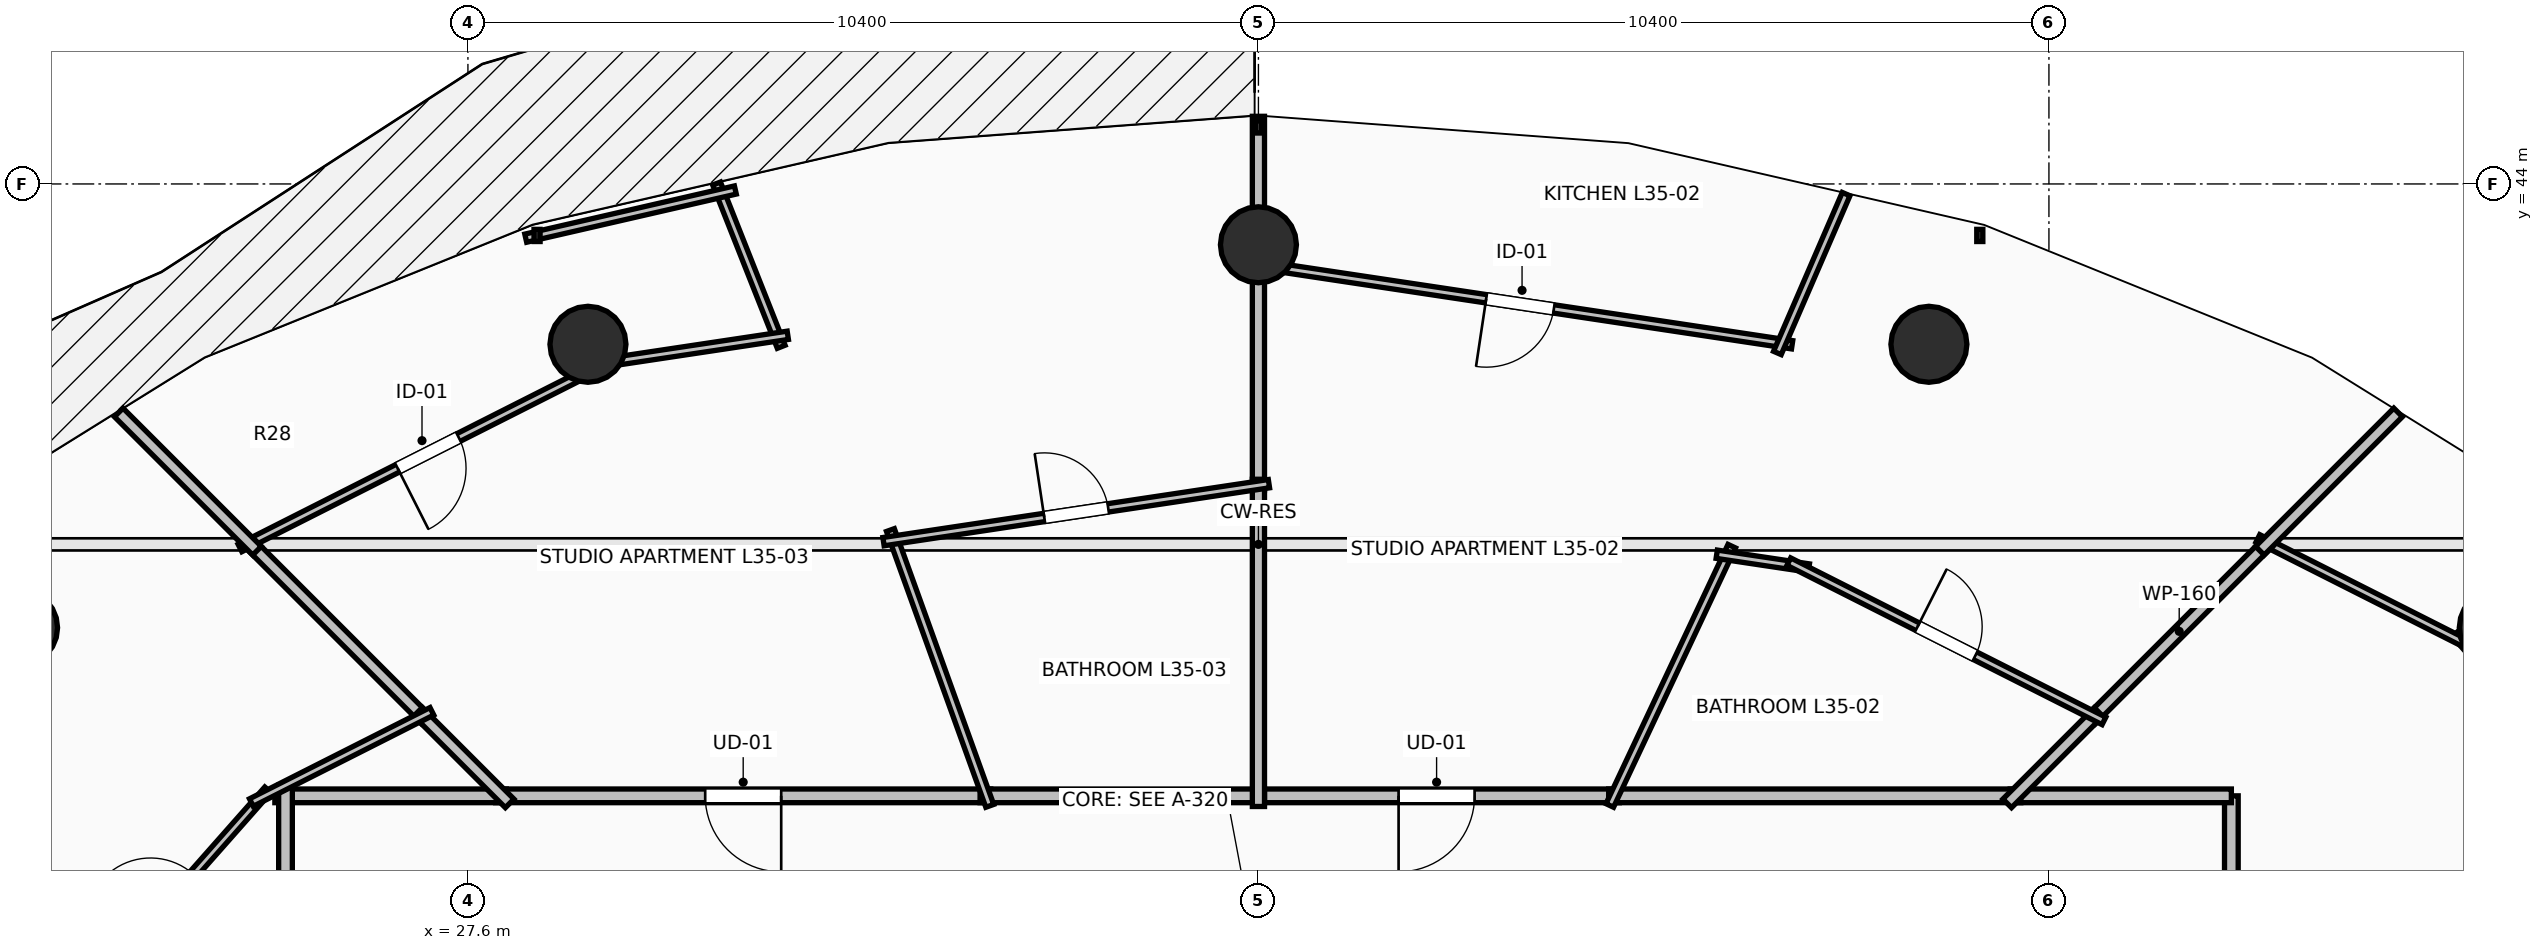
"""IFC4 building model, lengths in metres.
Left out: names, types, materials, properties, quantities, classifications, styles, units other than length and angle.
Written with IfcOpenShell. Run it as: python <this file> out.ifc"""

import sys

from ifc_helpers import new_model, si_unit, direction, frame, frame_2d, origin, origin_2d, place, context, subcontext, project, spatial, rectangle, circle, extrude, element, fill, save


model = new_model("IFC4")
c1 = context("Model", 3, precision=1e-05, world=origin(), true_north=direction((0.0, 1.0)))
c2 = subcontext(c1, "Body", "Model", "MODEL_VIEW")
j1 = project(units=[si_unit("LENGTHUNIT", "METRE"), si_unit("PLANEANGLEUNIT", "RADIAN")], contexts=[c1])
p1 = place(None, origin())
s1 = spatial("IfcSite", under=j1, at=p1, CompositionType="ELEMENT")
p2 = place(p1, origin())
s2 = spatial("IfcBuilding", under=s1, at=p2, CompositionType="ELEMENT")
p3 = place(p2, frame((0.0, 0.0, 132.6)))
s3 = spatial("IfcBuildingStorey", under=s2, at=p3, CompositionType="ELEMENT", Elevation=132.6)
for number, where, z_axis, x_axis in (
    (1, (54.299, 38.162, 0.0), (0.0, 0.0, 1.0), (0.707, 0.707, 0.0)),
    (2, (46.821, 41.891, 0.0), (0.0, 0.0, 1.0), (0.383, 0.924, 0.0)),
    (3, (38.0, 43.2, 0.0), (0.0, 0.0, 1.0), (0.0, 1.0, 0.0)),
    (4, (29.179, 41.891, 0.0), (0.0, 0.0, 1.0), (-0.383, 0.924, 0.0)),
    (5, (21.701, 38.162, 0.0), (0.0, 0.0, 1.0), (-0.707, 0.707, 0.0)),
):
    element("IfcColumn", number, at=place(p3, frame(where, z_axis=z_axis, x_axis=x_axis)), inside=s3, PredefinedType="COLUMN", context=c2, shape_type="SweptSolid", body=[
        extrude(circle(Radius=0.5, at=origin_2d()), origin(), (0.0, 0.0, 1.0), 3.5),
    ])
p4 = place(p3, frame((50.8, 30.548, 0.0), z_axis=(0.0, 0.0, 1.0), x_axis=(0.0, 1.0, 0.0)))
e6 = element("IfcWall", 6, at=p4, inside=s3, PredefinedType="PARTITIONING", context=c2, shape_type="SweptSolid", body=[
    extrude(rectangle(XDim=5.402, YDim=0.18, at=frame_2d((2.701, 0.0))), origin(), (0.0, 0.0, 1.0), 2.432),
])
p5 = place(p4, frame((2.201, 0.0, 0.0)))
e7 = element("IfcOpeningElement", 7, at=p5, cuts=e6, PredefinedType="OPENING", context=c2, shape_type="SweptSolid", body=[
    extrude(rectangle(XDim=1.0, YDim=2.15, at=frame_2d((0.5, 1.075))), frame((0.0, 0.105, 0.0), z_axis=(0.0, -1.0, 0.0), x_axis=(1.0, 0.0, 0.0)), (0.0, 0.0, 1.0), 0.21),
])
p6 = place(p3, frame((50.8, 35.95, 0.0), z_axis=(0.0, 0.0, 1.0), x_axis=(-1.0, 0.0, 0.0)))
e8 = element("IfcWall", 8, at=p6, inside=s3, PredefinedType="PARTITIONING", context=c2, shape_type="SweptSolid", body=[
    extrude(rectangle(XDim=2.91, YDim=0.18, at=frame_2d((1.455, 0.0))), origin(), (0.0, 0.0, 1.0), 2.432),
])
p7 = place(p3, frame((42.748, 35.95, 0.0), z_axis=(0.0, 0.0, 1.0), x_axis=(-1.0, 0.0, 0.0)))
e9 = element("IfcWall", 9, at=p7, inside=s3, PredefinedType="PARTITIONING", context=c2, shape_type="SweptSolid", body=[
    extrude(rectangle(XDim=4.808, YDim=0.18, at=frame_2d((2.404, 0.0))), origin(), (0.0, 0.0, 1.0), 3.24),
])
p8 = place(p7, frame((1.904, 0.0, 0.0)))
e10 = element("IfcOpeningElement", 10, at=p8, cuts=e9, PredefinedType="OPENING", context=c2, shape_type="SweptSolid", body=[
    extrude(rectangle(XDim=1.0, YDim=2.15, at=frame_2d((0.5, 1.075))), frame((0.0, 0.105, 0.0), z_axis=(0.0, -1.0, 0.0), x_axis=(1.0, 0.0, 0.0)), (0.0, 0.0, 1.0), 0.21),
])
p9 = place(p3, frame((48.03, 35.95, 0.0), z_axis=(0.0, 0.0, 1.0), x_axis=(-1.0, 0.0, 0.0)))
e11 = element("IfcWall", 11, at=p9, inside=s3, PredefinedType="PARTITIONING", context=c2, shape_type="SweptSolid", body=[
    extrude(rectangle(XDim=5.422, YDim=0.18, at=frame_2d((2.711, 0.0))), origin(), (0.0, 0.0, 1.0), 2.432),
])
p10 = place(p3, frame((34.478, 35.95, 0.0), z_axis=(0.0, 0.0, 1.0), x_axis=(-1.0, 0.0, 0.0)))
e12 = element("IfcWall", 12, at=p10, inside=s3, PredefinedType="PARTITIONING", context=c2, shape_type="SweptSolid", body=[
    extrude(rectangle(XDim=6.513, YDim=0.18, at=frame_2d((3.256, 0.0))), origin(), (0.0, 0.0, 1.0), 2.432),
])
p11 = place(p10, frame((2.757, 0.0, 0.0)))
e13 = element("IfcOpeningElement", 13, at=p11, cuts=e12, PredefinedType="OPENING", context=c2, shape_type="SweptSolid", body=[
    extrude(rectangle(XDim=1.0, YDim=2.15, at=frame_2d((0.5, 1.075))), frame((0.0, 0.105, 0.0), z_axis=(0.0, -1.0, 0.0), x_axis=(1.0, 0.0, 0.0)), (0.0, 0.0, 1.0), 0.21),
])
p12 = place(p3, frame((38.08, 35.95, 0.0), z_axis=(0.0, 0.0, 1.0), x_axis=(-1.0, 0.0, 0.0)))
e14 = element("IfcWall", 14, at=p12, inside=s3, PredefinedType="PARTITIONING", context=c2, shape_type="SweptSolid", body=[
    extrude(rectangle(XDim=3.742, YDim=0.18, at=frame_2d((1.871, 0.0))), origin(), (0.0, 0.0, 1.0), 3.24),
])
p13 = place(p3, frame((28.105, 35.95, 0.0), z_axis=(0.0, 0.0, 1.0), x_axis=(-1.0, 0.0, 0.0)))
e15 = element("IfcWall", 15, at=p13, inside=s3, PredefinedType="PARTITIONING", context=c2, shape_type="SweptSolid", body=[
    extrude(rectangle(XDim=3.045, YDim=0.18, at=frame_2d((1.522, 0.0))), origin(), (0.0, 0.0, 1.0), 2.432),
])
p14 = place(p3, frame((25.2, 36.09, 0.0), z_axis=(0.0, 0.0, 1.0), x_axis=(0.0, -1.0, 0.0)))
e16 = element("IfcWall", 16, at=p14, inside=s3, PredefinedType="PARTITIONING", context=c2, shape_type="SweptSolid", body=[
    extrude(rectangle(XDim=4.141, YDim=0.18, at=frame_2d((2.071, 0.0))), origin(), (0.0, 0.0, 1.0), 2.432),
])
p15 = place(p3, frame((57.668, 33.645, 0.0), z_axis=(0.0, 0.0, 1.0), x_axis=(-0.66214504072, 0.749375703536, 0.0)))
e17 = element("IfcWall", 17, at=p15, inside=s3, PredefinedType="PARTITIONING", context=c2, shape_type="SweptSolid", body=[
    extrude(rectangle(XDim=5.922, YDim=0.11, at=frame_2d((2.961, 0.0))), origin(), (0.0, 0.0, 1.0), 2.432),
])
p16 = place(p15, frame((2.511, 0.0, 0.0)))
e18 = element("IfcOpeningElement", 18, at=p16, cuts=e17, PredefinedType="OPENING", context=c2, shape_type="SweptSolid", body=[
    extrude(rectangle(XDim=0.9, YDim=2.1, at=frame_2d((0.45, 1.05))), frame((0.0, 0.07, 0.0), z_axis=(0.0, -1.0, 0.0), x_axis=(1.0, 0.0, 0.0)), (0.0, 0.0, 1.0), 0.14),
])
p17 = place(p3, frame((53.964, 37.915, 0.0), z_axis=(0.0, 0.0, 1.0), x_axis=(-0.892546166909, 0.450956028828, 0.0)))
e19 = element("IfcWall", 19, at=p17, inside=s3, PredefinedType="PARTITIONING", context=c2, shape_type="SweptSolid", body=[
    extrude(rectangle(XDim=3.154, YDim=0.11, at=frame_2d((1.577, 0.0))), origin(), (0.0, 0.0, 1.0), 2.432),
])
p18 = place(p3, frame((51.274, 39.274, 0.0), z_axis=(0.0, 0.0, 1.0), x_axis=(-0.707106781187, -0.707106781187, 0.0)))
e20 = element("IfcWall", 20, at=p18, inside=s3, PredefinedType="PARTITIONING", context=c2, shape_type="SweptSolid", body=[
    extrude(rectangle(XDim=3.281, YDim=0.16, at=frame_2d((1.64, 0.0))), origin(), (0.0, 0.0, 1.0), 2.874),
])
p19 = place(p3, frame((49.053, 37.053, 0.0), z_axis=(0.0, 0.0, 1.0), x_axis=(-0.707106781187, -0.707106781187, 0.0)))
e21 = element("IfcWall", 21, at=p19, inside=s3, PredefinedType="PARTITIONING", context=c2, shape_type="SweptSolid", body=[
    extrude(rectangle(XDim=1.7, YDim=0.16, at=frame_2d((0.85, 0.0))), origin(), (0.0, 0.0, 1.0), 2.432),
])
p20 = place(p3, frame((52.994, 40.994, 0.0), z_axis=(0.0, 0.0, 1.0), x_axis=(-0.707106781187, -0.707106781187, 0.0)))
e22 = element("IfcWall", 22, at=p20, inside=s3, PredefinedType="PARTITIONING", context=c2, shape_type="SweptSolid", body=[
    extrude(rectangle(XDim=2.572, YDim=0.16, at=frame_2d((1.286, 0.0))), origin(), (0.0, 0.0, 1.0), 2.728),
])
p21 = place(p3, frame((42.622, 35.823, 0.0), z_axis=(0.0, 0.0, 1.0), x_axis=(0.425768969191, 0.904831909735, 0.0)))
e23 = element("IfcWall", 23, at=p21, inside=s3, PredefinedType="PARTITIONING", context=c2, shape_type="SweptSolid", body=[
    extrude(rectangle(XDim=3.77, YDim=0.11, at=frame_2d((1.885, 0.0))), origin(), (0.0, 0.0, 1.0), 2.874),
])
p22 = place(p3, frame((44.03, 39.129, 0.0), z_axis=(0.0, 0.0, 1.0), x_axis=(0.988983067014, -0.148028690329, 0.0)))
e24 = element("IfcWall", 24, at=p22, inside=s3, PredefinedType="PARTITIONING", context=c2, shape_type="SweptSolid", body=[
    extrude(rectangle(XDim=1.225, YDim=0.11, at=frame_2d((0.613, 0.0))), origin(), (0.0, 0.0, 1.0), 2.874),
])
p23 = place(p3, frame((44.978, 39.031, 0.0), z_axis=(0.0, 0.0, 1.0), x_axis=(0.892495276856, -0.451056737882, 0.0)))
e25 = element("IfcWall", 25, at=p23, inside=s3, PredefinedType="PARTITIONING", context=c2, shape_type="SweptSolid", body=[
    extrude(rectangle(XDim=4.645, YDim=0.11, at=frame_2d((2.323, 0.0))), origin(), (0.0, 0.0, 1.0), 2.432),
])
p24 = place(p23, frame((1.898, 0.0, 0.0)))
e26 = element("IfcOpeningElement", 26, at=p24, cuts=e25, PredefinedType="OPENING", context=c2, shape_type="SweptSolid", body=[
    extrude(rectangle(XDim=0.85, YDim=2.1, at=frame_2d((0.425, 1.05))), frame((0.0, 0.07, 0.0), z_axis=(0.0, -1.0, 0.0), x_axis=(1.0, 0.0, 0.0)), (0.0, 0.0, 1.0), 0.14),
])
p25 = place(p3, frame((45.021, 41.884, 0.0), z_axis=(0.0, 0.0, 1.0), x_axis=(-0.988887079739, 0.148668569392, 0.0)))
e27 = element("IfcWall", 27, at=p25, inside=s3, PredefinedType="PARTITIONING", context=c2, shape_type="SweptSolid", body=[
    extrude(rectangle(XDim=7.24, YDim=0.11, at=frame_2d((3.62, 0.0))), origin(), (0.0, 0.0, 1.0), 2.432),
])
p26 = place(p25, frame((3.17, 0.0, 0.0)))
e28 = element("IfcOpeningElement", 28, at=p26, cuts=e27, PredefinedType="OPENING", context=c2, shape_type="SweptSolid", body=[
    extrude(rectangle(XDim=0.9, YDim=2.1, at=frame_2d((0.45, 1.05))), frame((0.0, 0.07, 0.0), z_axis=(0.0, -1.0, 0.0), x_axis=(1.0, 0.0, 0.0)), (0.0, 0.0, 1.0), 0.14),
])
p27 = place(p3, frame((45.732, 43.866, 0.0), z_axis=(0.0, 0.0, 1.0), x_axis=(-0.397125966554, -0.91776411277, 0.0)))
e29 = element("IfcWall", 29, at=p27, inside=s3, PredefinedType="PARTITIONING", context=c2, shape_type="SweptSolid", body=[
    extrude(rectangle(XDim=2.277, YDim=0.11, at=frame_2d((1.139, 0.0))), origin(), (0.0, 0.0, 1.0), 2.728),
])
p28 = place(p3, frame((38.0, 42.94, 0.0), z_axis=(0.0, 0.0, 1.0), x_axis=(0.0, -1.0, 0.0)))
e30 = element("IfcWall", 30, at=p28, inside=s3, PredefinedType="PARTITIONING", context=c2, shape_type="SweptSolid", body=[
    extrude(rectangle(XDim=2.965, YDim=0.16, at=frame_2d((1.482, 0.0))), origin(), (0.0, 0.0, 1.0), 2.874),
])
p29 = place(p3, frame((38.0, 40.115, 0.0), z_axis=(0.0, 0.0, 1.0), x_axis=(0.0, -1.0, 0.0)))
e31 = element("IfcWall", 31, at=p29, inside=s3, PredefinedType="PARTITIONING", context=c2, shape_type="SweptSolid", body=[
    extrude(rectangle(XDim=4.305, YDim=0.16, at=frame_2d((2.152, 0.0))), origin(), (0.0, 0.0, 1.0), 2.874),
])
p30 = place(p3, frame((38.0, 44.89, 0.0), z_axis=(0.0, 0.0, 1.0), x_axis=(0.0, -1.0, 0.0)))
e32 = element("IfcWall", 32, at=p30, inside=s3, PredefinedType="PARTITIONING", context=c2, shape_type="SweptSolid", body=[
    extrude(rectangle(XDim=2.09, YDim=0.16, at=frame_2d((1.045, 0.0))), origin(), (0.0, 0.0, 1.0), 3.24),
])
p31 = place(p3, frame((34.465, 35.818, 0.0), z_axis=(0.0, 0.0, 1.0), x_axis=(-0.338813618534, 0.940853512453, 0.0)))
e33 = element("IfcWall", 33, at=p31, inside=s3, PredefinedType="PARTITIONING", context=c2, shape_type="SweptSolid", body=[
    extrude(rectangle(XDim=3.856, YDim=0.11, at=frame_2d((1.928, 0.0))), origin(), (0.0, 0.0, 1.0), 2.432),
])
p32 = place(p3, frame((33.068, 39.294, 0.0), z_axis=(0.0, 0.0, 1.0), x_axis=(0.988876905643, 0.148736227888, 0.0)))
e34 = element("IfcWall", 34, at=p32, inside=s3, PredefinedType="PARTITIONING", context=c2, shape_type="SweptSolid", body=[
    extrude(rectangle(XDim=5.128, YDim=0.11, at=frame_2d((2.564, 0.0))), origin(), (0.0, 0.0, 1.0), 2.432),
])
p33 = place(p32, frame((2.139, 0.0, 0.0)))
e35 = element("IfcOpeningElement", 35, at=p33, cuts=e34, PredefinedType="OPENING", context=c2, shape_type="SweptSolid", body=[
    extrude(rectangle(XDim=0.85, YDim=2.1, at=frame_2d((0.425, 1.05))), frame((0.0, 0.07, 0.0), z_axis=(0.0, -1.0, 0.0), x_axis=(1.0, 0.0, 0.0)), (0.0, 0.0, 1.0), 0.14),
])
p34 = place(p3, frame((30.872, 44.005, 0.0), z_axis=(0.0, 0.0, 1.0), x_axis=(0.368016079814, -0.929819426017, 0.0)))
e36 = element("IfcWall", 36, at=p34, inside=s3, PredefinedType="PARTITIONING", context=c2, shape_type="SweptSolid", body=[
    extrude(rectangle(XDim=2.309, YDim=0.11, at=frame_2d((1.155, 0.0))), origin(), (0.0, 0.0, 1.0), 2.728),
])
p35 = place(p3, frame((31.808, 42.009, 0.0), z_axis=(0.0, 0.0, 1.0), x_axis=(-0.988887788943, -0.148663851958, 0.0)))
e37 = element("IfcWall", 37, at=p35, inside=s3, PredefinedType="PARTITIONING", context=c2, shape_type="SweptSolid", body=[
    extrude(rectangle(XDim=2.547, YDim=0.11, at=frame_2d((1.273, 0.0))), origin(), (0.0, 0.0, 1.0), 3.24),
])
p36 = place(p3, frame((29.553, 41.714, 0.0), z_axis=(0.0, 0.0, 1.0), x_axis=(-0.892438454993, -0.451169152369, 0.0)))
e38 = element("IfcWall", 38, at=p36, inside=s3, PredefinedType="PARTITIONING", context=c2, shape_type="SweptSolid", body=[
    extrude(rectangle(XDim=5.549, YDim=0.11, at=frame_2d((2.774, 0.0))), origin(), (0.0, 0.0, 1.0), 2.432),
])
p37 = place(p36, frame((2.324, 0.0, 0.0)))
e39 = element("IfcOpeningElement", 39, at=p37, cuts=e38, PredefinedType="OPENING", context=c2, shape_type="SweptSolid", body=[
    extrude(rectangle(XDim=0.9, YDim=2.1, at=frame_2d((0.45, 1.05))), frame((0.0, 0.07, 0.0), z_axis=(0.0, -1.0, 0.0), x_axis=(1.0, 0.0, 0.0)), (0.0, 0.0, 1.0), 0.14),
])
p38 = place(p3, frame((31.118, 43.92, 0.0), z_axis=(0.0, 0.0, 1.0), x_axis=(-0.974594373263, -0.223977247963, 0.0)))
e40 = element("IfcWall", 40, at=p38, inside=s3, PredefinedType="PARTITIONING", context=c2, shape_type="SweptSolid", body=[
    extrude(rectangle(XDim=2.83, YDim=0.11, at=frame_2d((1.415, 0.0))), origin(), (0.0, 0.0, 1.0), 3.24),
])
p39 = place(p3, frame((24.726, 39.274, 0.0), z_axis=(0.0, 0.0, 1.0), x_axis=(0.707106781187, -0.707106781187, 0.0)))
e41 = element("IfcWall", 41, at=p39, inside=s3, PredefinedType="PARTITIONING", context=c2, shape_type="SweptSolid", body=[
    extrude(rectangle(XDim=3.277, YDim=0.16, at=frame_2d((1.638, 0.0))), origin(), (0.0, 0.0, 1.0), 2.874),
])
p40 = place(p3, frame((26.944, 37.056, 0.0), z_axis=(0.0, 0.0, 1.0), x_axis=(0.707106781187, -0.707106781187, 0.0)))
e42 = element("IfcWall", 42, at=p40, inside=s3, PredefinedType="PARTITIONING", context=c2, shape_type="SweptSolid", body=[
    extrude(rectangle(XDim=1.704, YDim=0.16, at=frame_2d((0.852, 0.0))), origin(), (0.0, 0.0, 1.0), 2.432),
])
p41 = place(p3, frame((23.006, 40.994, 0.0), z_axis=(0.0, 0.0, 1.0), x_axis=(0.707106781187, -0.707106781187, 0.0)))
e43 = element("IfcWall", 43, at=p41, inside=s3, PredefinedType="PARTITIONING", context=c2, shape_type="SweptSolid", body=[
    extrude(rectangle(XDim=2.572, YDim=0.16, at=frame_2d((1.286, 0.0))), origin(), (0.0, 0.0, 1.0), 2.728),
])
p42 = place(p3, frame((22.443, 33.172, 0.0), z_axis=(0.0, 0.0, 1.0), x_axis=(0.662199468358, 0.749327607997, 0.0)))
e44 = element("IfcWall", 44, at=p42, inside=s3, PredefinedType="PARTITIONING", context=c2, shape_type="SweptSolid", body=[
    extrude(rectangle(XDim=3.814, YDim=0.11, at=frame_2d((1.907, 0.0))), origin(), (0.0, 0.0, 1.0), 2.432),
])
p43 = place(p42, frame((1.482, 0.0, 0.0)))
e45 = element("IfcOpeningElement", 45, at=p43, cuts=e44, PredefinedType="OPENING", context=c2, shape_type="SweptSolid", body=[
    extrude(rectangle(XDim=0.85, YDim=2.1, at=frame_2d((0.425, 1.05))), frame((0.0, 0.07, 0.0), z_axis=(0.0, -1.0, 0.0), x_axis=(1.0, 0.0, 0.0)), (0.0, 0.0, 1.0), 0.14),
])
p44 = place(p3, frame((24.751, 35.862, 0.0), z_axis=(0.0, 0.0, 1.0), x_axis=(0.892455114256, 0.451136197882, 0.0)))
e46 = element("IfcWall", 46, at=p44, inside=s3, PredefinedType="PARTITIONING", context=c2, shape_type="SweptSolid", body=[
    extrude(rectangle(XDim=2.661, YDim=0.11, at=frame_2d((1.331, 0.0))), origin(), (0.0, 0.0, 1.0), 3.24),
])
p45 = place(p8, origin())
e47 = element("IfcDoor", 47, at=p45, inside=s3, OperationType="SINGLE_SWING_RIGHT", PredefinedType="DOOR", context=c2, shape_type="SweptSolid", body=[
    extrude(rectangle(XDim=1.0, YDim=2.15, at=frame_2d((0.5, 1.075))), frame((0.0, 0.025, 0.0), z_axis=(0.0, -1.0, 0.0), x_axis=(1.0, 0.0, 0.0)), (0.0, 0.0, 1.0), 0.05),
])
fill(e10, e47)
p46 = place(p11, origin())
e48 = element("IfcDoor", 48, at=p46, inside=s3, OperationType="SINGLE_SWING_LEFT", PredefinedType="DOOR", context=c2, shape_type="SweptSolid", body=[
    extrude(rectangle(XDim=1.0, YDim=2.15, at=frame_2d((0.5, 1.075))), frame((0.0, 0.025, 0.0), z_axis=(0.0, -1.0, 0.0), x_axis=(1.0, 0.0, 0.0)), (0.0, 0.0, 1.0), 0.05),
])
fill(e13, e48)
p47 = place(p24, origin())
e49 = element("IfcDoor", 49, at=p47, inside=s3, OperationType="SINGLE_SWING_LEFT", PredefinedType="DOOR", context=c2, shape_type="SweptSolid", body=[
    extrude(rectangle(XDim=0.85, YDim=2.1, at=frame_2d((0.425, 1.05))), frame((0.0, 0.025, 0.0), z_axis=(0.0, -1.0, 0.0), x_axis=(1.0, 0.0, 0.0)), (0.0, 0.0, 1.0), 0.05),
])
fill(e26, e49)
p48 = place(p26, origin())
e50 = element("IfcDoor", 50, at=p48, inside=s3, OperationType="SINGLE_SWING_RIGHT", PredefinedType="DOOR", context=c2, shape_type="SweptSolid", body=[
    extrude(rectangle(XDim=0.9, YDim=2.1, at=frame_2d((0.45, 1.05))), frame((0.0, 0.025, 0.0), z_axis=(0.0, -1.0, 0.0), x_axis=(1.0, 0.0, 0.0)), (0.0, 0.0, 1.0), 0.05),
])
fill(e28, e50)
p49 = place(p33, origin())
e51 = element("IfcDoor", 51, at=p49, inside=s3, OperationType="SINGLE_SWING_LEFT", PredefinedType="DOOR", context=c2, shape_type="SweptSolid", body=[
    extrude(rectangle(XDim=0.85, YDim=2.1, at=frame_2d((0.425, 1.05))), frame((0.0, 0.025, 0.0), z_axis=(0.0, -1.0, 0.0), x_axis=(1.0, 0.0, 0.0)), (0.0, 0.0, 1.0), 0.05),
])
fill(e35, e51)
p50 = place(p37, origin())
e52 = element("IfcDoor", 52, at=p50, inside=s3, OperationType="SINGLE_SWING_RIGHT", PredefinedType="DOOR", context=c2, shape_type="SweptSolid", body=[
    extrude(rectangle(XDim=0.9, YDim=2.1, at=frame_2d((0.45, 1.05))), frame((0.0, 0.025, 0.0), z_axis=(0.0, -1.0, 0.0), x_axis=(1.0, 0.0, 0.0)), (0.0, 0.0, 1.0), 0.05),
])
fill(e39, e52)
save(model, sys.argv[1])
